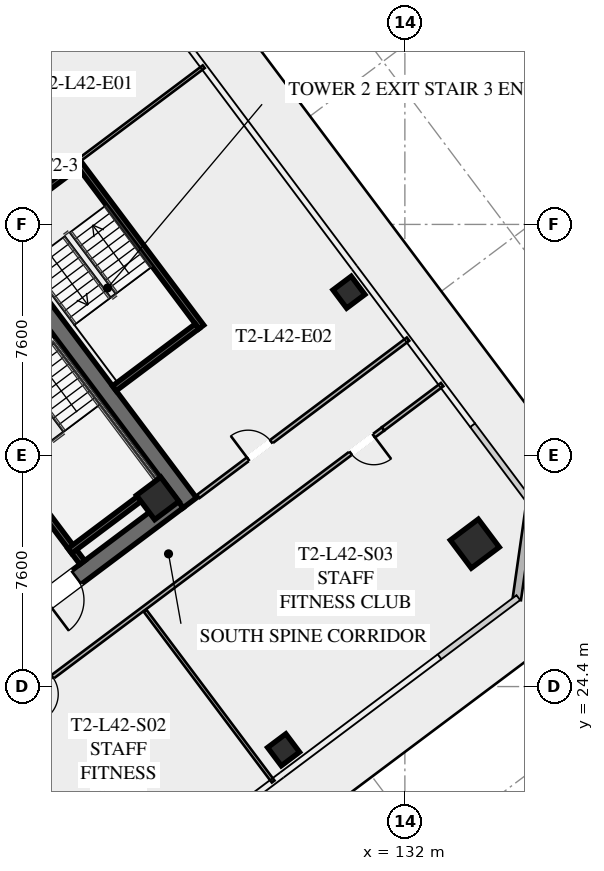
"""IFC4 building model, lengths in metres.
Left out: names, types, materials, properties, quantities, classifications, styles, units other than length and angle.
Written with IfcOpenShell. Run it as: python <this file> out.ifc"""

import sys

from ifc_helpers import new_model, si_unit, direction, frame, frame_2d, origin, origin_2d, place, context, subcontext, project, spatial, rectangle, hollow_rectangle, extrude, element, fill, save


model = new_model("IFC4")
c1 = context("Model", 3, precision=1e-05, world=origin(), true_north=direction((0.0, 1.0)))
c2 = subcontext(c1, "Body", "Model", "MODEL_VIEW")
j1 = project(units=[si_unit("LENGTHUNIT", "METRE"), si_unit("PLANEANGLEUNIT", "RADIAN")], contexts=[c1])
p1 = place(None, origin())
s1 = spatial("IfcSite", under=j1, at=p1, CompositionType="ELEMENT")
p2 = place(p1, origin())
s2 = spatial("IfcBuilding", under=s1, at=p2, CompositionType="ELEMENT")
p3 = place(p2, frame((0.0, 0.0, 157.0)))
s3 = spatial("IfcBuildingStorey", under=s2, at=p3, CompositionType="ELEMENT", Elevation=157.0)
p4 = place(p3, frame((115.564, 42.923, 0.0), z_axis=(0.0, 0.0, 1.0), x_axis=(0.600005007985, -0.799996243986, 0.0)))
e1 = element("IfcWall", 1, at=p4, inside=s3, PredefinedType="SHEAR", context=c2, shape_type="SweptSolid", body=[
    extrude(rectangle(XDim=15.6, YDim=0.55, at=frame_2d((7.8, 0.0))), origin(), (0.0, 0.0, 1.0), 3.55),
])
p5 = place(p3, frame((124.539, 30.498, 0.0), z_axis=(0.0, 0.0, 1.0), x_axis=(-0.799998054672, -0.600002593761, 0.0)))
e2 = element("IfcWall", 2, at=p5, inside=s3, PredefinedType="SHEAR", context=c2, shape_type="SweptSolid", body=[
    extrude(rectangle(XDim=15.06, YDim=0.55, at=frame_2d((7.53, 0.0))), origin(), (0.0, 0.0, 1.0), 3.55),
])
p6 = place(p5, frame((9.23, 0.0, 0.0)))
e3 = element("IfcOpeningElement", 3, at=p6, cuts=e2, PredefinedType="OPENING", context=c2, shape_type="SweptSolid", body=[
    extrude(rectangle(XDim=1.25, YDim=2.25, at=frame_2d((0.625, 1.125))), frame((0.0, 0.285, 0.0), z_axis=(0.0, -1.0, 0.0), x_axis=(1.0, 0.0, 0.0)), (0.0, 0.0, 1.0), 0.57),
])
p7 = place(p5, frame((4.18, 0.0, 0.0)))
e4 = element("IfcOpeningElement", 4, at=p7, cuts=e2, PredefinedType="OPENING", context=c2, shape_type="SweptSolid", body=[
    extrude(rectangle(XDim=1.25, YDim=2.25, at=frame_2d((0.625, 1.125))), frame((0.0, 0.285, 0.0), z_axis=(0.0, -1.0, 0.0), x_axis=(1.0, 0.0, 0.0)), (0.0, 0.0, 1.0), 0.57),
])
p8 = place(p3, frame((123.87, 30.59, 0.0), z_axis=(0.0, 0.0, 1.0), x_axis=(0.799999996291, 0.600000004945, 0.0)))
e5 = element("IfcColumn", 5, at=p8, inside=s3, PredefinedType="COLUMN", context=c2, shape_type="SweptSolid", body=[
    extrude(hollow_rectangle(XDim=1.0, YDim=1.0, WallThickness=0.04, at=origin_2d()), origin(), (0.0, 0.0, 1.0), 3.37),
])
p9 = place(p3, frame((134.3, 29.1, -0.175), z_axis=(0.0, 0.0, 1.0), x_axis=(0.799999996291, 0.600000004945, 0.0)))
e6 = element("IfcColumn", 6, at=p9, inside=s3, PredefinedType="COLUMN", context=c2, shape_type="SweptSolid", body=[
    extrude(hollow_rectangle(XDim=1.15, YDim=1.15, WallThickness=0.045, at=origin_2d()), origin(), (0.0, 0.0, 1.0), 3.545),
])
for number, where, z_axis, x_axis in (
    (7, (128.01, 22.32, -0.175), (0.0, 0.0, 1.0), (0.8, 0.6, 0.0)),
    (8, (130.16, 37.37, -0.175), (0.0, 0.0, 1.0), (0.8, 0.6, 0.0)),
):
    element("IfcColumn", number, at=place(p3, frame(where, z_axis=z_axis, x_axis=x_axis)), inside=s3, PredefinedType="COLUMN", context=c2, shape_type="SweptSolid", body=[
        extrude(hollow_rectangle(XDim=0.75, YDim=0.75, WallThickness=0.032, at=origin_2d()), origin(), (0.0, 0.0, 1.0), 3.545),
    ])
p10 = place(p3, frame((136.14, 30.48, 0.0), z_axis=(0.0, 0.0, 1.0), x_axis=(-0.141410847992, -0.989950994782, 0.0)))
e9 = element("IfcWall", 9, at=p10, inside=s3, PredefinedType="SOLIDWALL", context=c2, shape_type="SweptSolid", body=[
    extrude(rectangle(XDim=3.253, YDim=0.28, at=frame_2d((1.626, 0.0))), origin(), (0.0, 0.0, 1.0), 3.37),
])
p11 = place(p3, frame((116.56, 34.92, 0.0), z_axis=(0.0, 0.0, 1.0), x_axis=(0.59999029481, -0.8000072788, 0.0)))
e10 = element("IfcWall", 10, at=p11, inside=s3, PredefinedType="SHEAR", context=c2, shape_type="SweptSolid", body=[
    extrude(rectangle(XDim=8.05, YDim=0.2, at=frame_2d((4.025, 0.0))), origin(), (0.0, 0.0, 1.0), 3.37),
])
p12 = place(p11, frame((0.45, 0.0, 0.0)))
e11 = element("IfcOpeningElement", 11, at=p12, cuts=e10, PredefinedType="OPENING", context=c2, shape_type="SweptSolid", body=[
    extrude(rectangle(XDim=1.15, YDim=2.2, at=frame_2d((0.575, 1.1))), frame((0.0, 0.11, 0.0), z_axis=(0.0, -1.0, 0.0), x_axis=(1.0, 0.0, 0.0)), (0.0, 0.0, 1.0), 0.22),
])
p13 = place(p3, frame((120.98, 28.86, 0.0), z_axis=(0.0, 0.0, 1.0), x_axis=(0.800015298837, 0.599979601008, 0.0)))
e12 = element("IfcWall", 12, at=p13, inside=s3, PredefinedType="SHEAR", context=c2, shape_type="SweptSolid", body=[
    extrude(rectangle(XDim=3.83, YDim=0.2, at=frame_2d((1.915, 0.0))), origin(), (0.0, 0.0, 1.0), 3.37),
])
p14 = place(p3, frame((125.304, 36.228, 0.0), z_axis=(0.0, 0.0, 1.0), x_axis=(-0.59998851072, 0.800008616831, 0.0)))
e13 = element("IfcWall", 13, at=p14, inside=s3, PredefinedType="SHEAR", context=c2, shape_type="SweptSolid", body=[
    extrude(rectangle(XDim=6.8, YDim=0.2, at=frame_2d((3.4, 0.0))), origin(), (0.0, 0.0, 1.0), 3.37),
])
p15 = place(p3, frame((121.204, 41.528, 0.0), z_axis=(0.0, 0.0, 1.0), x_axis=(-0.800017232136, -0.599977023131, 0.0)))
e14 = element("IfcWall", 14, at=p15, inside=s3, PredefinedType="SHEAR", context=c2, shape_type="SweptSolid", body=[
    extrude(rectangle(XDim=3.4, YDim=0.2, at=frame_2d((1.7, 0.0))), origin(), (0.0, 0.0, 1.0), 3.37),
])
p16 = place(p15, frame((1.975, 0.0, 0.0)))
e15 = element("IfcOpeningElement", 15, at=p16, cuts=e14, PredefinedType="OPENING", context=c2, shape_type="SweptSolid", body=[
    extrude(rectangle(XDim=1.15, YDim=2.2, at=frame_2d((0.575, 1.1))), frame((0.0, 0.11, 0.0), z_axis=(0.0, -1.0, 0.0), x_axis=(1.0, 0.0, 0.0)), (0.0, 0.0, 1.0), 0.22),
])
p17 = place(p3, frame((122.444, 34.208, 0.0), z_axis=(0.0, 0.0, 1.0), x_axis=(0.79999138319, 0.600011488909, 0.0)))
e16 = element("IfcWall", 16, at=p17, inside=s3, PredefinedType="SHEAR", context=c2, shape_type="SweptSolid", body=[
    extrude(rectangle(XDim=3.4, YDim=0.2, at=frame_2d((1.7, 0.0))), origin(), (0.0, 0.0, 1.0), 3.37),
])
p18 = place(p3, frame((131.282, 32.874, 0.0), z_axis=(0.0, 0.0, 1.0), x_axis=(-0.8, -0.6, 0.0)))
e17 = element("IfcWall", 17, at=p18, inside=s3, PredefinedType="PARTITIONING", context=c2, shape_type="SweptSolid", body=[
    extrude(rectangle(XDim=28.7, YDim=0.135, at=frame_2d((14.35, 0.0))), origin(), (0.0, 0.0, 1.0), 2.723),
])
p19 = place(p18, frame((27.37, 0.0, 0.0)))
e18 = element("IfcOpeningElement", 18, at=p19, cuts=e17, PredefinedType="OPENING", context=c2, shape_type="SweptSolid", body=[
    extrude(rectangle(XDim=0.95, YDim=2.05, at=frame_2d((0.475, 1.025))), frame((0.0, 0.077, 0.0), z_axis=(0.0, -1.0, 0.0), x_axis=(1.0, 0.0, 0.0)), (0.0, 0.0, 1.0), 0.155),
])
p20 = place(p18, frame((13.592, 0.0, 0.0)))
e19 = element("IfcOpeningElement", 19, at=p20, cuts=e17, PredefinedType="OPENING", context=c2, shape_type="SweptSolid", body=[
    extrude(rectangle(XDim=0.95, YDim=2.05, at=frame_2d((0.475, 1.025))), frame((0.0, 0.077, 0.0), z_axis=(0.0, -1.0, 0.0), x_axis=(1.0, 0.0, 0.0)), (0.0, 0.0, 1.0), 0.155),
])
p21 = place(p18, frame((0.38, 0.0, 0.0)))
e20 = element("IfcOpeningElement", 20, at=p21, cuts=e17, PredefinedType="OPENING", context=c2, shape_type="SweptSolid", body=[
    extrude(rectangle(XDim=0.95, YDim=2.05, at=frame_2d((0.475, 1.025))), frame((0.0, 0.077, 0.0), z_axis=(0.0, -1.0, 0.0), x_axis=(1.0, 0.0, 0.0)), (0.0, 0.0, 1.0), 0.155),
])
p22 = place(p3, frame((131.282, 32.874, 0.0), z_axis=(0.0, 0.0, 1.0), x_axis=(0.800012055778, 0.599983925293, 0.0)))
e21 = element("IfcWall", 21, at=p22, inside=s3, PredefinedType="PARTITIONING", context=c2, shape_type="SweptSolid", body=[
    extrude(rectangle(XDim=2.43, YDim=0.135, at=frame_2d((1.215, 0.0))), origin(), (0.0, 0.0, 1.0), 2.723),
])
for number, where, z_axis, x_axis in (
    (22, (121.748, 16.836, 0.0), (0.0, 0.0, 1.0), (-0.6, 0.8, 0.0)),
    (23, (127.668, 21.276, 0.0), (0.0, 0.0, 1.0), (-0.6, 0.8, 0.0)),
):
    element("IfcWall", number, at=place(p3, frame(where, z_axis=z_axis, x_axis=x_axis)), inside=s3, PredefinedType="PARTITIONING", context=c2, shape_type="SweptSolid", body=[
        extrude(rectangle(XDim=7.03, YDim=0.11, at=frame_2d((3.515, 0.0))), origin(), (0.0, 0.0, 1.0), 2.723),
    ])
p23 = place(p3, frame((122.744, 48.308, 0.0), z_axis=(0.0, 0.0, 1.0), x_axis=(-0.79997892247, -0.600028102345, 0.0)))
e24 = element("IfcWall", 24, at=p23, inside=s3, PredefinedType="PARTITIONING", context=c2, shape_type="SweptSolid", body=[
    extrude(rectangle(XDim=6.95, YDim=0.135, at=frame_2d((3.475, 0.0))), origin(), (0.0, 0.0, 1.0), 2.723),
])
p24 = place(p23, frame((3.35, 0.0, 0.0)))
e25 = element("IfcOpeningElement", 25, at=p24, cuts=e24, PredefinedType="OPENING", context=c2, shape_type="SweptSolid", body=[
    extrude(rectangle(XDim=0.95, YDim=2.05, at=frame_2d((0.475, 1.025))), frame((0.0, 0.077, 0.0), z_axis=(0.0, -1.0, 0.0), x_axis=(1.0, 0.0, 0.0)), (0.0, 0.0, 1.0), 0.155),
])
p25 = place(p3, frame((125.208, 30.656, 0.0), z_axis=(0.0, 0.0, 1.0), x_axis=(0.800006797429, 0.599990936654, 0.0)))
e26 = element("IfcWall", 26, at=p25, inside=s3, PredefinedType="PARTITIONING", context=c2, shape_type="SweptSolid", body=[
    extrude(rectangle(XDim=8.62, YDim=0.135, at=frame_2d((4.31, 0.0))), origin(), (0.0, 0.0, 1.0), 2.723),
])
p26 = place(p25, frame((2.045, 0.0, 0.0)))
e27 = element("IfcOpeningElement", 27, at=p26, cuts=e26, PredefinedType="OPENING", context=c2, shape_type="SweptSolid", body=[
    extrude(rectangle(XDim=0.95, YDim=2.05, at=frame_2d((0.475, 1.025))), frame((0.0, 0.077, 0.0), z_axis=(0.0, -1.0, 0.0), x_axis=(1.0, 0.0, 0.0)), (0.0, 0.0, 1.0), 0.155),
])
p27 = place(p3, frame((125.384, 44.788, 0.0), z_axis=(0.0, 0.0, 1.0), x_axis=(-0.8, -0.6, 0.0)))
e28 = element("IfcWall", 28, at=p27, inside=s3, PredefinedType="PARTITIONING", context=c2, shape_type="SweptSolid", body=[
    extrude(rectangle(XDim=5.1, YDim=0.11, at=frame_2d((2.55, 0.0))), origin(), (0.0, 0.0, 1.0), 2.723),
])
p28 = place(p7, origin())
e29 = element("IfcDoor", 29, at=p28, inside=s3, OperationType="SINGLE_SWING_RIGHT", PredefinedType="DOOR", context=c2, shape_type="SweptSolid", body=[
    extrude(rectangle(XDim=1.25, YDim=2.25, at=frame_2d((0.625, 1.125))), frame((0.0, 0.025, 0.0), z_axis=(0.0, -1.0, 0.0), x_axis=(1.0, 0.0, 0.0)), (0.0, 0.0, 1.0), 0.05),
])
fill(e4, e29)
p29 = place(p20, origin())
e30 = element("IfcDoor", 30, at=p29, inside=s3, OperationType="SINGLE_SWING_RIGHT", PredefinedType="DOOR", context=c2, shape_type="SweptSolid", body=[
    extrude(rectangle(XDim=0.95, YDim=2.05, at=frame_2d((0.475, 1.025))), frame((0.0, 0.025, 0.0), z_axis=(0.0, -1.0, 0.0), x_axis=(1.0, 0.0, 0.0)), (0.0, 0.0, 1.0), 0.05),
])
fill(e19, e30)
p30 = place(p21, origin())
e31 = element("IfcDoor", 31, at=p30, inside=s3, OperationType="SINGLE_SWING_LEFT", PredefinedType="DOOR", context=c2, shape_type="SweptSolid", body=[
    extrude(rectangle(XDim=0.95, YDim=2.05, at=frame_2d((0.475, 1.025))), frame((0.0, 0.025, 0.0), z_axis=(0.0, -1.0, 0.0), x_axis=(1.0, 0.0, 0.0)), (0.0, 0.0, 1.0), 0.05),
])
fill(e20, e31)
p31 = place(p26, origin())
e32 = element("IfcDoor", 32, at=p31, inside=s3, OperationType="SINGLE_SWING_LEFT", PredefinedType="DOOR", context=c2, shape_type="SweptSolid", body=[
    extrude(rectangle(XDim=0.95, YDim=2.05, at=frame_2d((0.475, 1.025))), frame((0.0, 0.025, 0.0), z_axis=(0.0, -1.0, 0.0), x_axis=(1.0, 0.0, 0.0)), (0.0, 0.0, 1.0), 0.05),
])
fill(e27, e32)
save(model, sys.argv[1])
